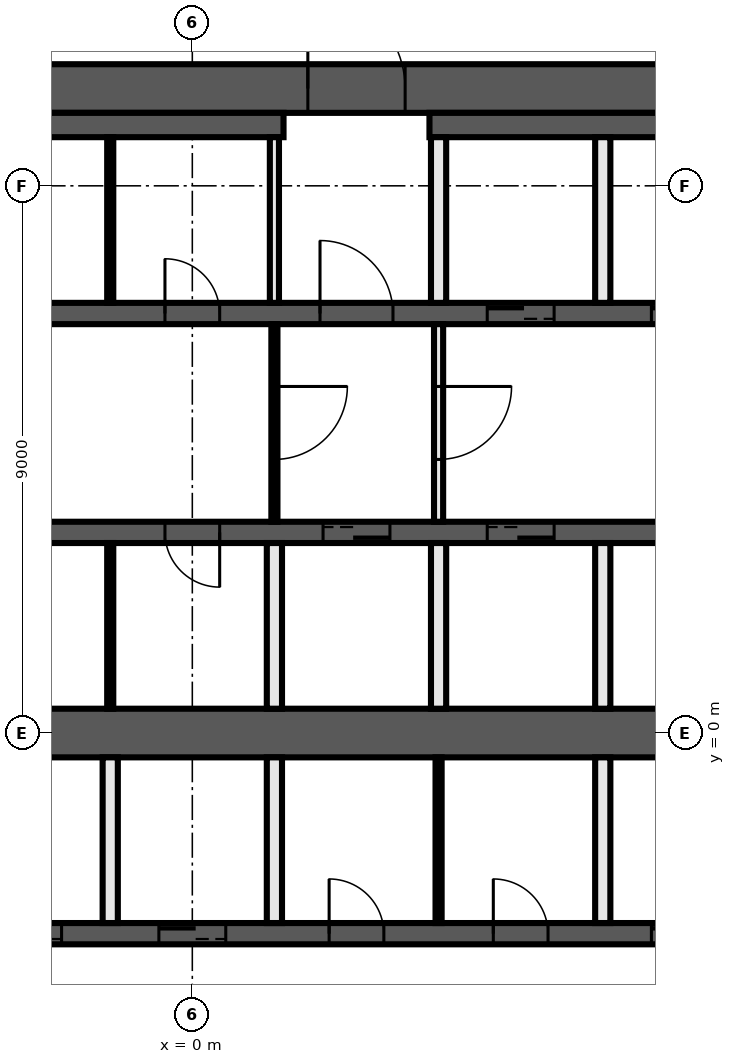
"""IFC4 building model, lengths in metres.
Left out: names, types, materials, properties, quantities, classifications, styles, units other than length and angle.
Written with IfcOpenShell. Run it as: python <this file> out.ifc"""

import sys

from ifc_helpers import new_model, si_unit, direction, frame, frame_2d, origin, place, context, subcontext, project, spatial, rectangle, extrude, element, fill, save


model = new_model("IFC4")
c1 = context("Model", 3, precision=1e-05, world=origin(), true_north=direction((0.0, 1.0)))
c2 = subcontext(c1, "Body", "Model", "MODEL_VIEW")
j1 = project(units=[si_unit("LENGTHUNIT", "METRE"), si_unit("PLANEANGLEUNIT", "RADIAN")], contexts=[c1])
p1 = place(None, origin())
s1 = spatial("IfcSite", under=j1, at=p1, CompositionType="ELEMENT")
p2 = place(p1, origin())
s2 = spatial("IfcBuilding", under=s1, at=p2, CompositionType="ELEMENT")
p3 = place(p2, frame((0.0, 0.0, 171.2)))
s3 = spatial("IfcBuildingStorey", under=s2, at=p3, CompositionType="ELEMENT", Elevation=171.2)
p4 = place(p3, frame((-14.0, 10.6, 0.0), z_axis=(0.0, 0.0, 1.0), x_axis=(1.0, 0.0, 0.0)))
e1 = element("IfcWall", 1, at=p4, inside=s3, PredefinedType="SHEAR", context=c2, shape_type="SweptSolid", body=[
    extrude(rectangle(XDim=28.0, YDim=0.8, at=frame_2d((14.0, 0.0))), origin(), (0.0, 0.0, 1.0), 3.82),
])
p5 = place(p4, frame((15.9, 0.0, 0.0)))
e2 = element("IfcOpeningElement", 2, at=p5, cuts=e1, PredefinedType="OPENING", context=c2, shape_type="SweptSolid", body=[
    extrude(rectangle(XDim=1.6, YDim=2.1, at=frame_2d((0.8, 1.05))), frame((0.0, 0.41, 0.0), z_axis=(0.0, -1.0, 0.0), x_axis=(1.0, 0.0, 0.0)), (0.0, 0.0, 1.0), 0.82),
])
p6 = place(p3, frame((-13.2, 10.0, 0.0), z_axis=(0.0, 0.0, 1.0), x_axis=(1.0, 0.0, 0.0)))
e3 = element("IfcWall", 3, at=p6, inside=s3, PredefinedType="SHEAR", context=c2, shape_type="SweptSolid", body=[
    extrude(rectangle(XDim=14.7, YDim=0.4, at=frame_2d((7.35, 0.0))), origin(), (0.0, 0.0, 1.0), 3.82),
])
p7 = place(p3, frame((3.9, 10.0, 0.0), z_axis=(0.0, 0.0, 1.0), x_axis=(1.0, 0.0, 0.0)))
e4 = element("IfcWall", 4, at=p7, inside=s3, PredefinedType="SHEAR", context=c2, shape_type="SweptSolid", body=[
    extrude(rectangle(XDim=9.3, YDim=0.4, at=frame_2d((4.65, 0.0))), origin(), (0.0, 0.0, 1.0), 3.82),
])
p8 = place(p3, frame((-9.45, 6.9, 0.0), z_axis=(0.0, 0.0, 1.0), x_axis=(1.0, 0.0, 0.0)))
e5 = element("IfcWall", 5, at=p8, inside=s3, PredefinedType="SHEAR", context=c2, shape_type="SweptSolid", body=[
    extrude(rectangle(XDim=18.9, YDim=0.35, at=frame_2d((9.45, 0.0))), origin(), (0.0, 0.0, 1.0), 3.82),
])
p9 = place(p8, frame((11.55, 0.0, 0.0)))
e6 = element("IfcOpeningElement", 6, at=p9, cuts=e5, PredefinedType="OPENING", context=c2, shape_type="SweptSolid", body=[
    extrude(rectangle(XDim=1.2, YDim=2.1, at=frame_2d((0.6, 1.05))), frame((0.0, 0.185, 0.0), z_axis=(0.0, -1.0, 0.0), x_axis=(1.0, 0.0, 0.0)), (0.0, 0.0, 1.0), 0.37),
])
p10 = place(p8, frame((14.3, 0.0, 0.0)))
e7 = element("IfcOpeningElement", 7, at=p10, cuts=e5, PredefinedType="OPENING", context=c2, shape_type="SweptSolid", body=[
    extrude(rectangle(XDim=1.1, YDim=2.1, at=frame_2d((0.55, 1.05))), frame((0.0, 0.185, 0.0), z_axis=(0.0, -1.0, 0.0), x_axis=(1.0, 0.0, 0.0)), (0.0, 0.0, 1.0), 0.37),
])
p11 = place(p8, frame((17.0, 0.0, 0.0)))
e8 = element("IfcOpeningElement", 8, at=p11, cuts=e5, PredefinedType="OPENING", context=c2, shape_type="SweptSolid", body=[
    extrude(rectangle(XDim=1.1, YDim=2.1, at=frame_2d((0.55, 1.05))), frame((0.0, 0.185, 0.0), z_axis=(0.0, -1.0, 0.0), x_axis=(1.0, 0.0, 0.0)), (0.0, 0.0, 1.0), 0.37),
])
p12 = place(p8, frame((3.6, 0.0, 0.0)))
e9 = element("IfcOpeningElement", 9, at=p12, cuts=e5, PredefinedType="OPENING", context=c2, shape_type="SweptSolid", body=[
    extrude(rectangle(XDim=0.9, YDim=2.1, at=frame_2d((0.45, 1.05))), frame((0.0, 0.185, 0.0), z_axis=(0.0, -1.0, 0.0), x_axis=(1.0, 0.0, 0.0)), (0.0, 0.0, 1.0), 0.37),
])
p13 = place(p8, frame((9.0, 0.0, 0.0)))
e10 = element("IfcOpeningElement", 10, at=p13, cuts=e5, PredefinedType="OPENING", context=c2, shape_type="SweptSolid", body=[
    extrude(rectangle(XDim=0.9, YDim=2.1, at=frame_2d((0.45, 1.05))), frame((0.0, 0.185, 0.0), z_axis=(0.0, -1.0, 0.0), x_axis=(1.0, 0.0, 0.0)), (0.0, 0.0, 1.0), 0.37),
])
p14 = place(p3, frame((9.45, 3.3, 0.0), z_axis=(0.0, 0.0, 1.0), x_axis=(-1.0, 0.0, 0.0)))
e11 = element("IfcWall", 11, at=p14, inside=s3, PredefinedType="SHEAR", context=c2, shape_type="SweptSolid", body=[
    extrude(rectangle(XDim=18.9, YDim=0.35, at=frame_2d((9.45, 0.0))), origin(), (0.0, 0.0, 1.0), 3.82),
])
p15 = place(p14, frame((6.2, 0.0, 0.0)))
e12 = element("IfcOpeningElement", 12, at=p15, cuts=e11, PredefinedType="OPENING", context=c2, shape_type="SweptSolid", body=[
    extrude(rectangle(XDim=1.1, YDim=2.1, at=frame_2d((0.55, 1.05))), frame((0.0, 0.185, 0.0), z_axis=(0.0, -1.0, 0.0), x_axis=(1.0, 0.0, 0.0)), (0.0, 0.0, 1.0), 0.37),
])
p16 = place(p14, frame((3.5, 0.0, 0.0)))
e13 = element("IfcOpeningElement", 13, at=p16, cuts=e11, PredefinedType="OPENING", context=c2, shape_type="SweptSolid", body=[
    extrude(rectangle(XDim=1.1, YDim=2.1, at=frame_2d((0.55, 1.05))), frame((0.0, 0.185, 0.0), z_axis=(0.0, -1.0, 0.0), x_axis=(1.0, 0.0, 0.0)), (0.0, 0.0, 1.0), 0.37),
])
p17 = place(p14, frame((0.9, 0.0, 0.0)))
e14 = element("IfcOpeningElement", 14, at=p17, cuts=e11, PredefinedType="OPENING", context=c2, shape_type="SweptSolid", body=[
    extrude(rectangle(XDim=0.9, YDim=2.1, at=frame_2d((0.45, 1.05))), frame((0.0, 0.185, 0.0), z_axis=(0.0, -1.0, 0.0), x_axis=(1.0, 0.0, 0.0)), (0.0, 0.0, 1.0), 0.37),
])
p18 = place(p14, frame((14.4, 0.0, 0.0)))
e15 = element("IfcOpeningElement", 15, at=p18, cuts=e11, PredefinedType="OPENING", context=c2, shape_type="SweptSolid", body=[
    extrude(rectangle(XDim=0.9, YDim=2.1, at=frame_2d((0.45, 1.05))), frame((0.0, 0.185, 0.0), z_axis=(0.0, -1.0, 0.0), x_axis=(1.0, 0.0, 0.0)), (0.0, 0.0, 1.0), 0.37),
])
p19 = place(p14, frame((9.0, 0.0, 0.0)))
e16 = element("IfcOpeningElement", 16, at=p19, cuts=e11, PredefinedType="OPENING", context=c2, shape_type="SweptSolid", body=[
    extrude(rectangle(XDim=0.9, YDim=2.1, at=frame_2d((0.45, 1.05))), frame((0.0, 0.185, 0.0), z_axis=(0.0, -1.0, 0.0), x_axis=(1.0, 0.0, 0.0)), (0.0, 0.0, 1.0), 0.37),
])
p20 = place(p3, frame((-9.45, -3.3, 0.0), z_axis=(0.0, 0.0, 1.0), x_axis=(1.0, 0.0, 0.0)))
e17 = element("IfcWall", 17, at=p20, inside=s3, PredefinedType="SHEAR", context=c2, shape_type="SweptSolid", body=[
    extrude(rectangle(XDim=18.9, YDim=0.35, at=frame_2d((9.45, 0.0))), origin(), (0.0, 0.0, 1.0), 3.82),
])
p21 = place(p20, frame((0.8, 0.0, 0.0)))
e18 = element("IfcOpeningElement", 18, at=p21, cuts=e17, PredefinedType="OPENING", context=c2, shape_type="SweptSolid", body=[
    extrude(rectangle(XDim=1.1, YDim=2.1, at=frame_2d((0.55, 1.05))), frame((0.0, 0.185, 0.0), z_axis=(0.0, -1.0, 0.0), x_axis=(1.0, 0.0, 0.0)), (0.0, 0.0, 1.0), 0.37),
])
p22 = place(p20, frame((3.5, 0.0, 0.0)))
e19 = element("IfcOpeningElement", 19, at=p22, cuts=e17, PredefinedType="OPENING", context=c2, shape_type="SweptSolid", body=[
    extrude(rectangle(XDim=1.1, YDim=2.1, at=frame_2d((0.55, 1.05))), frame((0.0, 0.185, 0.0), z_axis=(0.0, -1.0, 0.0), x_axis=(1.0, 0.0, 0.0)), (0.0, 0.0, 1.0), 0.37),
])
p23 = place(p20, frame((6.2, 0.0, 0.0)))
e20 = element("IfcOpeningElement", 20, at=p23, cuts=e17, PredefinedType="OPENING", context=c2, shape_type="SweptSolid", body=[
    extrude(rectangle(XDim=1.1, YDim=2.1, at=frame_2d((0.55, 1.05))), frame((0.0, 0.185, 0.0), z_axis=(0.0, -1.0, 0.0), x_axis=(1.0, 0.0, 0.0)), (0.0, 0.0, 1.0), 0.37),
])
p24 = place(p20, frame((8.9, 0.0, 0.0)))
e21 = element("IfcOpeningElement", 21, at=p24, cuts=e17, PredefinedType="OPENING", context=c2, shape_type="SweptSolid", body=[
    extrude(rectangle(XDim=1.1, YDim=2.1, at=frame_2d((0.55, 1.05))), frame((0.0, 0.185, 0.0), z_axis=(0.0, -1.0, 0.0), x_axis=(1.0, 0.0, 0.0)), (0.0, 0.0, 1.0), 0.37),
])
p25 = place(p20, frame((17.0, 0.0, 0.0)))
e22 = element("IfcOpeningElement", 22, at=p25, cuts=e17, PredefinedType="OPENING", context=c2, shape_type="SweptSolid", body=[
    extrude(rectangle(XDim=1.1, YDim=2.1, at=frame_2d((0.55, 1.05))), frame((0.0, 0.185, 0.0), z_axis=(0.0, -1.0, 0.0), x_axis=(1.0, 0.0, 0.0)), (0.0, 0.0, 1.0), 0.37),
])
p26 = place(p20, frame((11.7, 0.0, 0.0)))
e23 = element("IfcOpeningElement", 23, at=p26, cuts=e17, PredefinedType="OPENING", context=c2, shape_type="SweptSolid", body=[
    extrude(rectangle(XDim=0.9, YDim=2.1, at=frame_2d((0.45, 1.05))), frame((0.0, 0.185, 0.0), z_axis=(0.0, -1.0, 0.0), x_axis=(1.0, 0.0, 0.0)), (0.0, 0.0, 1.0), 0.37),
])
p27 = place(p20, frame((14.4, 0.0, 0.0)))
e24 = element("IfcOpeningElement", 24, at=p27, cuts=e17, PredefinedType="OPENING", context=c2, shape_type="SweptSolid", body=[
    extrude(rectangle(XDim=0.9, YDim=2.1, at=frame_2d((0.45, 1.05))), frame((0.0, 0.185, 0.0), z_axis=(0.0, -1.0, 0.0), x_axis=(1.0, 0.0, 0.0)), (0.0, 0.0, 1.0), 0.37),
])
p28 = place(p3, frame((-9.45, 0.0, 0.0), z_axis=(0.0, 0.0, 1.0), x_axis=(1.0, 0.0, 0.0)))
e25 = element("IfcWall", 25, at=p28, inside=s3, PredefinedType="SHEAR", context=c2, shape_type="SweptSolid", body=[
    extrude(rectangle(XDim=18.9, YDim=0.8, at=frame_2d((9.45, 0.0))), origin(), (0.0, 0.0, 1.0), 3.82),
])
for number, where, z_axis, x_axis in (
    (26, (6.75, -3.125, 0.0), (0.0, 0.0, 1.0), (0.0, 1.0, 0.0)),
    (27, (6.75, 0.4, 0.0), (0.0, 0.0, 1.0), (0.0, 1.0, 0.0)),
    (28, (6.75, 7.075, 0.0), (0.0, 0.0, 1.0), (0.0, 1.0, 0.0)),
):
    element("IfcWall", number, at=place(p3, frame(where, z_axis=z_axis, x_axis=x_axis)), inside=s3, PredefinedType="SOLIDWALL", context=c2, shape_type="SweptSolid", body=[
        extrude(rectangle(XDim=2.725, YDim=0.25, at=frame_2d((1.363, 0.0))), origin(), (0.0, 0.0, 1.0), 3.82),
    ])
p29 = place(p3, frame((4.05, 6.725, 0.0), z_axis=(0.0, 0.0, 1.0), x_axis=(0.0, -1.0, 0.0)))
e29 = element("IfcWall", 29, at=p29, inside=s3, PredefinedType="PARTITIONING", context=c2, shape_type="SweptSolid", body=[
    extrude(rectangle(XDim=3.25, YDim=0.15, at=frame_2d((1.625, 0.0))), origin(), (0.0, 0.0, 1.0), 3.82),
])
p30 = place(p29, frame((1.025, 0.0, 0.0)))
e30 = element("IfcOpeningElement", 30, at=p30, cuts=e29, PredefinedType="OPENING", context=c2, shape_type="SweptSolid", body=[
    extrude(rectangle(XDim=1.2, YDim=2.1, at=frame_2d((0.6, 1.05))), frame((0.0, 0.085, 0.0), z_axis=(0.0, -1.0, 0.0), x_axis=(1.0, 0.0, 0.0)), (0.0, 0.0, 1.0), 0.17),
])
p31 = place(p3, frame((4.05, -3.125, 0.0), z_axis=(0.0, 0.0, 1.0), x_axis=(0.0, 1.0, 0.0)))
e31 = element("IfcWall", 31, at=p31, inside=s3, PredefinedType="PARTITIONING", context=c2, shape_type="SweptSolid", body=[
    extrude(rectangle(XDim=2.725, YDim=0.1, at=frame_2d((1.363, 0.0))), origin(), (0.0, 0.0, 1.0), 3.82),
])
for number, where, z_axis, x_axis in (
    (32, (4.05, 0.4, 0.0), (0.0, 0.0, 1.0), (0.0, 1.0, 0.0)),
    (33, (4.05, 7.075, 0.0), (0.0, 0.0, 1.0), (0.0, 1.0, 0.0)),
):
    element("IfcWall", number, at=place(p3, frame(where, z_axis=z_axis, x_axis=x_axis)), inside=s3, PredefinedType="SOLIDWALL", context=c2, shape_type="SweptSolid", body=[
        extrude(rectangle(XDim=2.725, YDim=0.25, at=frame_2d((1.363, 0.0))), origin(), (0.0, 0.0, 1.0), 3.82),
    ])
p32 = place(p3, frame((1.35, 7.075, 0.0), z_axis=(0.0, 0.0, 1.0), x_axis=(0.0, 1.0, 0.0)))
e34 = element("IfcWall", 34, at=p32, inside=s3, PredefinedType="PARTITIONING", context=c2, shape_type="SweptSolid", body=[
    extrude(rectangle(XDim=2.725, YDim=0.15, at=frame_2d((1.363, 0.0))), origin(), (0.0, 0.0, 1.0), 3.82),
])
p33 = place(p3, frame((1.35, 6.725, 0.0), z_axis=(0.0, 0.0, 1.0), x_axis=(0.0, -1.0, 0.0)))
e35 = element("IfcWall", 35, at=p33, inside=s3, PredefinedType="PARTITIONING", context=c2, shape_type="SweptSolid", body=[
    extrude(rectangle(XDim=3.25, YDim=0.1, at=frame_2d((1.625, 0.0))), origin(), (0.0, 0.0, 1.0), 3.82),
])
p34 = place(p33, frame((1.025, 0.0, 0.0)))
e36 = element("IfcOpeningElement", 36, at=p34, cuts=e35, PredefinedType="OPENING", context=c2, shape_type="SweptSolid", body=[
    extrude(rectangle(XDim=1.2, YDim=2.1, at=frame_2d((0.6, 1.05))), frame((0.0, 0.06, 0.0), z_axis=(0.0, -1.0, 0.0), x_axis=(1.0, 0.0, 0.0)), (0.0, 0.0, 1.0), 0.12),
])
for number, where, z_axis, x_axis in (
    (37, (1.35, -3.125, 0.0), (0.0, 0.0, 1.0), (0.0, 1.0, 0.0)),
    (38, (1.35, 0.4, 0.0), (0.0, 0.0, 1.0), (0.0, 1.0, 0.0)),
):
    element("IfcWall", number, at=place(p3, frame(where, z_axis=z_axis, x_axis=x_axis)), inside=s3, PredefinedType="SOLIDWALL", context=c2, shape_type="SweptSolid", body=[
        extrude(rectangle(XDim=2.725, YDim=0.25, at=frame_2d((1.363, 0.0))), origin(), (0.0, 0.0, 1.0), 3.82),
    ])
for number, where, z_axis, x_axis in (
    (39, (-1.35, 0.4, 0.0), (0.0, 0.0, 1.0), (0.0, 1.0, 0.0)),
    (40, (-1.35, 7.075, 0.0), (0.0, 0.0, 1.0), (0.0, 1.0, 0.0)),
):
    element("IfcWall", number, at=place(p3, frame(where, z_axis=z_axis, x_axis=x_axis)), inside=s3, PredefinedType="PARTITIONING", context=c2, shape_type="SweptSolid", body=[
        extrude(rectangle(XDim=2.725, YDim=0.1, at=frame_2d((1.363, 0.0))), origin(), (0.0, 0.0, 1.0), 3.82),
    ])
p35 = place(p3, frame((-1.35, -3.125, 0.0), z_axis=(0.0, 0.0, 1.0), x_axis=(0.0, 1.0, 0.0)))
e41 = element("IfcWall", 41, at=p35, inside=s3, PredefinedType="SOLIDWALL", context=c2, shape_type="SweptSolid", body=[
    extrude(rectangle(XDim=2.725, YDim=0.25, at=frame_2d((1.363, 0.0))), origin(), (0.0, 0.0, 1.0), 3.82),
])
p36 = place(p5, origin())
e42 = element("IfcDoor", 42, at=p36, inside=s3, OperationType="DOUBLE_DOOR_SINGLE_SWING", PredefinedType="DOOR", context=c2, shape_type="SweptSolid", body=[
    extrude(rectangle(XDim=1.6, YDim=2.1, at=frame_2d((0.8, 1.05))), frame((0.0, 0.025, 0.0), z_axis=(0.0, -1.0, 0.0), x_axis=(1.0, 0.0, 0.0)), (0.0, 0.0, 1.0), 0.05),
])
fill(e2, e42)
p37 = place(p9, origin())
e43 = element("IfcDoor", 43, at=p37, inside=s3, OperationType="SINGLE_SWING_LEFT", PredefinedType="DOOR", context=c2, shape_type="SweptSolid", body=[
    extrude(rectangle(XDim=1.2, YDim=2.1, at=frame_2d((0.6, 1.05))), frame((0.0, 0.025, 0.0), z_axis=(0.0, -1.0, 0.0), x_axis=(1.0, 0.0, 0.0)), (0.0, 0.0, 1.0), 0.05),
])
fill(e6, e43)
p38 = place(p10, origin())
e44 = element("IfcDoor", 44, at=p38, inside=s3, OperationType="DOUBLE_DOOR_SLIDING", PredefinedType="DOOR", context=c2, shape_type="SweptSolid", body=[
    extrude(rectangle(XDim=1.1, YDim=2.1, at=frame_2d((0.55, 1.05))), frame((0.0, 0.025, 0.0), z_axis=(0.0, -1.0, 0.0), x_axis=(1.0, 0.0, 0.0)), (0.0, 0.0, 1.0), 0.05),
])
fill(e7, e44)
p39 = place(p11, origin())
e45 = element("IfcDoor", 45, at=p39, inside=s3, OperationType="DOUBLE_DOOR_SLIDING", PredefinedType="DOOR", context=c2, shape_type="SweptSolid", body=[
    extrude(rectangle(XDim=1.1, YDim=2.1, at=frame_2d((0.55, 1.05))), frame((0.0, 0.025, 0.0), z_axis=(0.0, -1.0, 0.0), x_axis=(1.0, 0.0, 0.0)), (0.0, 0.0, 1.0), 0.05),
])
fill(e8, e45)
p40 = place(p15, origin())
e46 = element("IfcDoor", 46, at=p40, inside=s3, OperationType="DOUBLE_DOOR_SLIDING", PredefinedType="DOOR", context=c2, shape_type="SweptSolid", body=[
    extrude(rectangle(XDim=1.1, YDim=2.1, at=frame_2d((0.55, 1.05))), frame((0.0, 0.025, 0.0), z_axis=(0.0, -1.0, 0.0), x_axis=(1.0, 0.0, 0.0)), (0.0, 0.0, 1.0), 0.05),
])
fill(e12, e46)
p41 = place(p16, origin())
e47 = element("IfcDoor", 47, at=p41, inside=s3, OperationType="DOUBLE_DOOR_SLIDING", PredefinedType="DOOR", context=c2, shape_type="SweptSolid", body=[
    extrude(rectangle(XDim=1.1, YDim=2.1, at=frame_2d((0.55, 1.05))), frame((0.0, 0.025, 0.0), z_axis=(0.0, -1.0, 0.0), x_axis=(1.0, 0.0, 0.0)), (0.0, 0.0, 1.0), 0.05),
])
fill(e13, e47)
p42 = place(p23, origin())
e48 = element("IfcDoor", 48, at=p42, inside=s3, OperationType="DOUBLE_DOOR_SLIDING", PredefinedType="DOOR", context=c2, shape_type="SweptSolid", body=[
    extrude(rectangle(XDim=1.1, YDim=2.1, at=frame_2d((0.55, 1.05))), frame((0.0, 0.025, 0.0), z_axis=(0.0, -1.0, 0.0), x_axis=(1.0, 0.0, 0.0)), (0.0, 0.0, 1.0), 0.05),
])
fill(e20, e48)
p43 = place(p24, origin())
e49 = element("IfcDoor", 49, at=p43, inside=s3, OperationType="DOUBLE_DOOR_SLIDING", PredefinedType="DOOR", context=c2, shape_type="SweptSolid", body=[
    extrude(rectangle(XDim=1.1, YDim=2.1, at=frame_2d((0.55, 1.05))), frame((0.0, 0.025, 0.0), z_axis=(0.0, -1.0, 0.0), x_axis=(1.0, 0.0, 0.0)), (0.0, 0.0, 1.0), 0.05),
])
fill(e21, e49)
p44 = place(p25, origin())
e50 = element("IfcDoor", 50, at=p44, inside=s3, OperationType="DOUBLE_DOOR_SLIDING", PredefinedType="DOOR", context=c2, shape_type="SweptSolid", body=[
    extrude(rectangle(XDim=1.1, YDim=2.1, at=frame_2d((0.55, 1.05))), frame((0.0, 0.025, 0.0), z_axis=(0.0, -1.0, 0.0), x_axis=(1.0, 0.0, 0.0)), (0.0, 0.0, 1.0), 0.05),
])
fill(e22, e50)
p45 = place(p13, origin())
e51 = element("IfcDoor", 51, at=p45, inside=s3, OperationType="SINGLE_SWING_LEFT", PredefinedType="DOOR", context=c2, shape_type="SweptSolid", body=[
    extrude(rectangle(XDim=0.9, YDim=2.1, at=frame_2d((0.45, 1.05))), frame((0.0, 0.025, 0.0), z_axis=(0.0, -1.0, 0.0), x_axis=(1.0, 0.0, 0.0)), (0.0, 0.0, 1.0), 0.05),
])
fill(e10, e51)
p46 = place(p19, origin())
e52 = element("IfcDoor", 52, at=p46, inside=s3, OperationType="SINGLE_SWING_LEFT", PredefinedType="DOOR", context=c2, shape_type="SweptSolid", body=[
    extrude(rectangle(XDim=0.9, YDim=2.1, at=frame_2d((0.45, 1.05))), frame((0.0, 0.025, 0.0), z_axis=(0.0, -1.0, 0.0), x_axis=(1.0, 0.0, 0.0)), (0.0, 0.0, 1.0), 0.05),
])
fill(e16, e52)
p47 = place(p26, origin())
e53 = element("IfcDoor", 53, at=p47, inside=s3, OperationType="SINGLE_SWING_RIGHT", PredefinedType="DOOR", context=c2, shape_type="SweptSolid", body=[
    extrude(rectangle(XDim=0.9, YDim=2.1, at=frame_2d((0.45, 1.05))), frame((0.0, 0.025, 0.0), z_axis=(0.0, -1.0, 0.0), x_axis=(1.0, 0.0, 0.0)), (0.0, 0.0, 1.0), 0.05),
])
fill(e23, e53)
p48 = place(p27, origin())
e54 = element("IfcDoor", 54, at=p48, inside=s3, OperationType="SINGLE_SWING_LEFT", PredefinedType="DOOR", context=c2, shape_type="SweptSolid", body=[
    extrude(rectangle(XDim=0.9, YDim=2.1, at=frame_2d((0.45, 1.05))), frame((0.0, 0.025, 0.0), z_axis=(0.0, -1.0, 0.0), x_axis=(1.0, 0.0, 0.0)), (0.0, 0.0, 1.0), 0.05),
])
fill(e24, e54)
p49 = place(p34, origin())
e55 = element("IfcDoor", 55, at=p49, inside=s3, OperationType="SINGLE_SWING_LEFT", PredefinedType="DOOR", context=c2, shape_type="SweptSolid", body=[
    extrude(rectangle(XDim=1.2, YDim=2.1, at=frame_2d((0.6, 1.05))), frame((0.0, 0.025, 0.0), z_axis=(0.0, -1.0, 0.0), x_axis=(1.0, 0.0, 0.0)), (0.0, 0.0, 1.0), 0.05),
])
fill(e36, e55)
p50 = place(p30, origin())
e56 = element("IfcDoor", 56, at=p50, inside=s3, OperationType="SINGLE_SWING_RIGHT", PredefinedType="DOOR", context=c2, shape_type="SweptSolid", body=[
    extrude(rectangle(XDim=1.2, YDim=2.1, at=frame_2d((0.6, 1.05))), frame((0.0, 0.025, 0.0), z_axis=(0.0, -1.0, 0.0), x_axis=(1.0, 0.0, 0.0)), (0.0, 0.0, 1.0), 0.05),
])
fill(e30, e56)
save(model, sys.argv[1])
